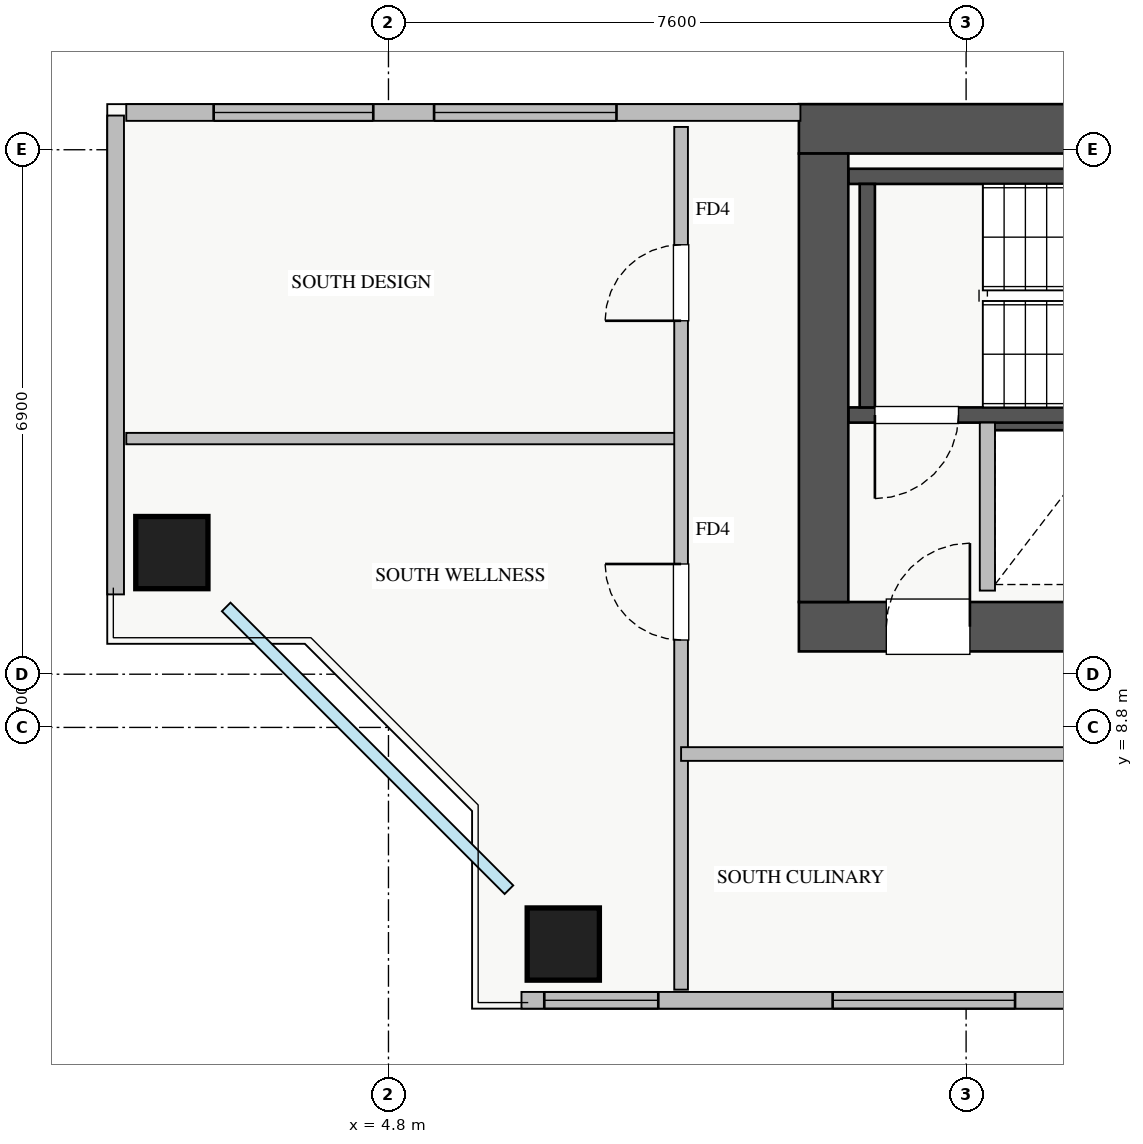
"""IFC4 building model, lengths in metres.
Left out: names, types, materials, properties, quantities, classifications, styles, units other than length and angle.
Written with IfcOpenShell. Run it as: python <this file> out.ifc"""

import sys

from ifc_helpers import new_model, si_unit, direction, frame, frame_2d, origin, origin_2d, place, context, subcontext, project, spatial, rectangle, extrude, source, transform, mapped, element, fill, save


model = new_model("IFC4")
c1 = context("Model", 3, precision=1e-05, world=origin(), true_north=direction((0.0, 1.0)))
c2 = subcontext(c1, "Body", "Model", "MODEL_VIEW")
j1 = project(units=[si_unit("LENGTHUNIT", "METRE"), si_unit("PLANEANGLEUNIT", "RADIAN")], contexts=[c1])
p1 = place(None, origin())
s1 = spatial("IfcSite", under=j1, at=p1, CompositionType="ELEMENT")
p2 = place(p1, origin())
s2 = spatial("IfcBuilding", under=s1, at=p2, CompositionType="ELEMENT")
p3 = place(p2, frame((0.0, 0.0, 169.75)))
s3 = spatial("IfcBuildingStorey", under=s2, at=p3, CompositionType="ELEMENT", Elevation=169.75)
p4 = place(p3, frame((12.68, 12.8, 0.0), z_axis=(0.0, 0.0, 1.0), x_axis=(1.0, 0.0, 0.0)))
e1 = element("IfcWall", 1, at=p4, inside=s3, PredefinedType="SHEAR", context=c2, shape_type="SweptSolid", body=[
    extrude(rectangle(XDim=1.94, YDim=0.18, at=frame_2d((0.97, 0.0))), origin(), (0.0, 0.0, 1.0), 3.0),
])
p5 = place(p3, frame((10.85, 12.91, 0.0), z_axis=(0.0, 0.0, 1.0), x_axis=(1.0, 0.0, 0.0)))
e2 = element("IfcWall", 2, at=p5, inside=s3, PredefinedType="SHEAR", context=c2, shape_type="SweptSolid", body=[
    extrude(rectangle(XDim=7.3, YDim=0.2, at=frame_2d((3.65, 0.0))), origin(), (0.0, 0.0, 1.0), 3.25),
])
p6 = place(p5, frame((0.35, 0.0, 0.0)))
e3 = element("IfcOpeningElement", 3, at=p6, cuts=e2, PredefinedType="OPENING", context=c2, shape_type="SweptSolid", body=[
    extrude(rectangle(XDim=1.1, YDim=2.05, at=frame_2d((0.55, 1.025))), frame((0.0, 0.11, 0.0), z_axis=(0.0, -1.0, 0.0), x_axis=(1.0, 0.0, 0.0)), (0.0, 0.0, 1.0), 0.22),
])
p7 = place(p3, frame((10.85, 16.05, 0.0), z_axis=(0.0, 0.0, 1.0), x_axis=(1.0, 0.0, 0.0)))
e4 = element("IfcWall", 4, at=p7, inside=s3, PredefinedType="SHEAR", context=c2, shape_type="SweptSolid", body=[
    extrude(rectangle(XDim=7.3, YDim=0.2, at=frame_2d((3.65, 0.0))), origin(), (0.0, 0.0, 1.0), 3.25),
])
p8 = place(p3, frame((11.1, 13.01, 0.0), z_axis=(0.0, 0.0, 1.0), x_axis=(0.0, 1.0, 0.0)))
e5 = element("IfcWall", 5, at=p8, inside=s3, PredefinedType="SHEAR", context=c2, shape_type="SweptSolid", body=[
    extrude(rectangle(XDim=2.94, YDim=0.2, at=frame_2d((1.47, 0.0))), origin(), (0.0, 0.0, 1.0), 3.25),
])
p9 = place(p3, frame((10.2, 10.125, 0.0), z_axis=(0.0, 0.0, 1.0), x_axis=(1.0, 0.0, 0.0)))
e6 = element("IfcWall", 6, at=p9, inside=s3, PredefinedType="SHEAR", context=c2, shape_type="SweptSolid", body=[
    extrude(rectangle(XDim=17.6, YDim=0.65, at=frame_2d((8.8, 0.0))), origin(), (0.0, 0.0, 1.0), 3.25),
])
p10 = place(p9, frame((1.15, 0.0, 0.0)))
e7 = element("IfcOpeningElement", 7, at=p10, cuts=e6, PredefinedType="OPENING", context=c2, shape_type="SweptSolid", body=[
    extrude(rectangle(XDim=1.1, YDim=2.05, at=frame_2d((0.55, 1.025))), frame((0.0, 0.335, 0.0), z_axis=(0.0, -1.0, 0.0), x_axis=(1.0, 0.0, 0.0)), (0.0, 0.0, 1.0), 0.67),
])
p11 = place(p9, frame((8.3, 0.0, 0.0)))
e8 = element("IfcOpeningElement", 8, at=p11, cuts=e6, PredefinedType="OPENING", context=c2, shape_type="SweptSolid", body=[
    extrude(rectangle(XDim=1.1, YDim=2.05, at=frame_2d((0.55, 1.025))), frame((0.0, 0.335, 0.0), z_axis=(0.0, -1.0, 0.0), x_axis=(1.0, 0.0, 0.0)), (0.0, 0.0, 1.0), 0.67),
])
p12 = place(p9, frame((4.9, 0.0, 0.0)))
e9 = element("IfcOpeningElement", 9, at=p12, cuts=e6, PredefinedType="OPENING", context=c2, shape_type="SweptSolid", body=[
    extrude(rectangle(XDim=1.1, YDim=2.05, at=frame_2d((0.55, 1.025))), frame((0.0, 0.335, 0.0), z_axis=(0.0, -1.0, 0.0), x_axis=(1.0, 0.0, 0.0)), (0.0, 0.0, 1.0), 0.67),
])
p13 = place(p9, frame((14.74, 0.0, 0.0)))
e10 = element("IfcOpeningElement", 10, at=p13, cuts=e6, PredefinedType="OPENING", context=c2, shape_type="SweptSolid", body=[
    extrude(rectangle(XDim=1.0, YDim=2.05, at=frame_2d((0.5, 1.025))), frame((0.0, 0.335, 0.0), z_axis=(0.0, -1.0, 0.0), x_axis=(1.0, 0.0, 0.0)), (0.0, 0.0, 1.0), 0.67),
])
p14 = place(p9, frame((10.64, 0.0, 0.0)))
e11 = element("IfcOpeningElement", 11, at=p14, cuts=e6, PredefinedType="OPENING", context=c2, shape_type="SweptSolid", body=[
    extrude(rectangle(XDim=1.0, YDim=2.05, at=frame_2d((0.5, 1.025))), frame((0.0, 0.335, 0.0), z_axis=(0.0, -1.0, 0.0), x_axis=(1.0, 0.0, 0.0)), (0.0, 0.0, 1.0), 0.67),
])
p15 = place(p9, frame((13.09, 0.0, 0.0)))
e12 = element("IfcOpeningElement", 12, at=p15, cuts=e6, PredefinedType="OPENING", context=c2, shape_type="SweptSolid", body=[
    extrude(rectangle(XDim=1.0, YDim=2.05, at=frame_2d((0.5, 1.025))), frame((0.0, 0.335, 0.0), z_axis=(0.0, -1.0, 0.0), x_axis=(1.0, 0.0, 0.0)), (0.0, 0.0, 1.0), 0.67),
])
p16 = place(p3, frame((10.2, 16.675, 0.0), z_axis=(0.0, 0.0, 1.0), x_axis=(1.0, 0.0, 0.0)))
e13 = element("IfcWall", 13, at=p16, inside=s3, PredefinedType="SHEAR", context=c2, shape_type="SweptSolid", body=[
    extrude(rectangle(XDim=17.6, YDim=0.65, at=frame_2d((8.8, 0.0))), origin(), (0.0, 0.0, 1.0), 3.25),
])
p17 = place(p3, frame((10.525, 10.45, 0.0), z_axis=(0.0, 0.0, 1.0), x_axis=(0.0, 1.0, 0.0)))
e14 = element("IfcWall", 14, at=p17, inside=s3, PredefinedType="SHEAR", context=c2, shape_type="SweptSolid", body=[
    extrude(rectangle(XDim=5.9, YDim=0.65, at=frame_2d((2.95, 0.0))), origin(), (0.0, 0.0, 1.0), 3.25),
])
m1 = source(origin(), c2, "Body", "SweptSolid", [
    extrude(rectangle(XDim=0.95, YDim=0.95, at=origin_2d()), origin(), (0.0, 0.0, 1.0), 3.25),
])
for number, where, z_axis, x_axis in (
    (15, (7.1, 5.95, 0.0), (0.0, 0.0, 1.0), (1.0, 0.0, 0.0)),
    (16, (1.95, 11.1, 0.0), (0.0, 0.0, 1.0), (1.0, 0.0, 0.0)),
):
    element("IfcColumn", number, at=place(p3, frame(where, z_axis=z_axis, x_axis=x_axis)), inside=s3, PredefinedType="COLUMN", context=c2, shape_type="MappedRepresentation", body=[
        mapped(m1, transform((0.0, 0.0, 0.0), x_axis=(1.0, 0.0, 0.0), y_axis=(0.0, 1.0, 0.0), z_axis=(0.0, 0.0, 1.0), scale=1.0)),
    ])
p18 = place(p3, frame((1.35, 16.89, 0.0), z_axis=(0.0, 0.0, 1.0), x_axis=(1.0, 0.0, 0.0)))
e17 = element("IfcWall", 17, at=p18, inside=s3, PredefinedType="STANDARD", context=c2, shape_type="SweptSolid", body=[
    extrude(rectangle(XDim=8.87, YDim=0.22, at=frame_2d((4.435, 0.0))), origin(), (0.0, 0.0, 1.0), 2.54),
])
p19 = place(p18, frame((1.15, 0.0, 0.9)))
e18 = element("IfcOpeningElement", 18, at=p19, cuts=e17, PredefinedType="OPENING", context=c2, shape_type="SweptSolid", body=[
    extrude(rectangle(XDim=2.1, YDim=1.46, at=frame_2d((1.05, 0.73))), frame((0.0, 0.12, 0.0), z_axis=(0.0, -1.0, 0.0), x_axis=(1.0, 0.0, 0.0)), (0.0, 0.0, 1.0), 0.24),
])
p20 = place(p18, frame((4.05, 0.0, 0.9)))
e19 = element("IfcOpeningElement", 19, at=p20, cuts=e17, PredefinedType="OPENING", context=c2, shape_type="SweptSolid", body=[
    extrude(rectangle(XDim=2.4, YDim=1.5, at=frame_2d((1.2, 0.75))), frame((0.0, 0.12, 0.0), z_axis=(0.0, -1.0, 0.0), x_axis=(1.0, 0.0, 0.0)), (0.0, 0.0, 1.0), 0.24),
])
p21 = place(p3, frame((1.21, 10.55, 0.0), z_axis=(0.0, 0.0, 1.0), x_axis=(0.0, 1.0, 0.0)))
e20 = element("IfcWall", 20, at=p21, inside=s3, PredefinedType="STANDARD", context=c2, shape_type="SweptSolid", body=[
    extrude(rectangle(XDim=6.3, YDim=0.22, at=frame_2d((3.15, 0.0))), origin(), (0.0, 0.0, 1.0), 2.54),
])
p22 = place(p3, frame((6.55, 5.21, 0.0), z_axis=(0.0, 0.0, 1.0), x_axis=(1.0, 0.0, 0.0)))
e21 = element("IfcWall", 21, at=p22, inside=s3, PredefinedType="STANDARD", context=c2, shape_type="SweptSolid", body=[
    extrude(rectangle(XDim=24.9, YDim=0.22, at=frame_2d((12.45, 0.0))), origin(), (0.0, 0.0, 1.0), 2.54),
])
p23 = place(p22, frame((0.3, 0.0, 0.9)))
e22 = element("IfcOpeningElement", 22, at=p23, cuts=e21, PredefinedType="OPENING", context=c2, shape_type="SweptSolid", body=[
    extrude(rectangle(XDim=1.5, YDim=1.5, at=frame_2d((0.75, 0.75))), frame((0.0, 0.12, 0.0), z_axis=(0.0, -1.0, 0.0), x_axis=(1.0, 0.0, 0.0)), (0.0, 0.0, 1.0), 0.24),
])
p24 = place(p22, frame((8.438, 0.0, 0.9)))
e23 = element("IfcOpeningElement", 23, at=p24, cuts=e21, PredefinedType="OPENING", context=c2, shape_type="SweptSolid", body=[
    extrude(rectangle(XDim=1.8, YDim=1.45, at=frame_2d((0.9, 0.725))), frame((0.0, 0.12, 0.0), z_axis=(0.0, -1.0, 0.0), x_axis=(1.0, 0.0, 0.0)), (0.0, 0.0, 1.0), 0.24),
])
p25 = place(p22, frame((14.813, 0.0, 0.9)))
e24 = element("IfcOpeningElement", 24, at=p25, cuts=e21, PredefinedType="OPENING", context=c2, shape_type="SweptSolid", body=[
    extrude(rectangle(XDim=1.5, YDim=1.45, at=frame_2d((0.75, 0.725))), frame((0.0, 0.12, 0.0), z_axis=(0.0, -1.0, 0.0), x_axis=(1.0, 0.0, 0.0)), (0.0, 0.0, 1.0), 0.24),
])
p26 = place(p22, frame((20.738, 0.0, 0.9)))
e25 = element("IfcOpeningElement", 25, at=p26, cuts=e21, PredefinedType="OPENING", context=c2, shape_type="SweptSolid", body=[
    extrude(rectangle(XDim=2.1, YDim=1.46, at=frame_2d((1.05, 0.73))), frame((0.0, 0.12, 0.0), z_axis=(0.0, -1.0, 0.0), x_axis=(1.0, 0.0, 0.0)), (0.0, 0.0, 1.0), 0.24),
])
p27 = place(p22, frame((4.094, 0.0, 0.9)))
e26 = element("IfcOpeningElement", 26, at=p27, cuts=e21, PredefinedType="OPENING", context=c2, shape_type="SweptSolid", body=[
    extrude(rectangle(XDim=2.4, YDim=1.5, at=frame_2d((1.2, 0.75))), frame((0.0, 0.12, 0.0), z_axis=(0.0, -1.0, 0.0), x_axis=(1.0, 0.0, 0.0)), (0.0, 0.0, 1.0), 0.24),
])
p28 = place(p3, frame((12.68, 10.6, 0.0), z_axis=(0.0, 0.0, 1.0), x_axis=(0.0, 1.0, 0.0)))
e27 = element("IfcWall", 27, at=p28, inside=s3, PredefinedType="PARTITIONING", context=c2, shape_type="SweptSolid", body=[
    extrude(rectangle(XDim=2.21, YDim=0.2, at=frame_2d((1.105, 0.0))), origin(), (0.0, 0.0, 1.0), 3.0),
])
p29 = place(p3, frame((1.35, 12.6, 0.0), z_axis=(0.0, 0.0, 1.0), x_axis=(1.0, 0.0, 0.0)))
e28 = element("IfcWall", 28, at=p29, inside=s3, PredefinedType="PARTITIONING", context=c2, shape_type="SweptSolid", body=[
    extrude(rectangle(XDim=7.3, YDim=0.15, at=frame_2d((3.65, 0.0))), origin(), (0.0, 0.0, 1.0), 3.0),
])
p30 = place(p3, frame((8.65, 5.35, 0.0), z_axis=(0.0, 0.0, 1.0), x_axis=(0.0, 1.0, 0.0)))
e29 = element("IfcWall", 29, at=p30, inside=s3, PredefinedType="PARTITIONING", context=c2, shape_type="SweptSolid", body=[
    extrude(rectangle(XDim=11.35, YDim=0.18, at=frame_2d((5.675, 0.0))), origin(), (0.0, 0.0, 1.0), 3.0),
])
p31 = place(p30, frame((4.6, 0.0, 0.0)))
e30 = element("IfcOpeningElement", 30, at=p31, cuts=e29, PredefinedType="OPENING", context=c2, shape_type="SweptSolid", body=[
    extrude(rectangle(XDim=1.0, YDim=2.05, at=frame_2d((0.5, 1.025))), frame((0.0, 0.1, 0.0), z_axis=(0.0, -1.0, 0.0), x_axis=(1.0, 0.0, 0.0)), (0.0, 0.0, 1.0), 0.2),
])
p32 = place(p30, frame((8.8, 0.0, 0.0)))
e31 = element("IfcOpeningElement", 31, at=p32, cuts=e29, PredefinedType="OPENING", context=c2, shape_type="SweptSolid", body=[
    extrude(rectangle(XDim=1.0, YDim=2.05, at=frame_2d((0.5, 1.025))), frame((0.0, 0.1, 0.0), z_axis=(0.0, -1.0, 0.0), x_axis=(1.0, 0.0, 0.0)), (0.0, 0.0, 1.0), 0.2),
])
p33 = place(p3, frame((8.65, 8.45, 0.0), z_axis=(0.0, 0.0, 1.0), x_axis=(1.0, 0.0, 0.0)))
e32 = element("IfcWall", 32, at=p33, inside=s3, PredefinedType="PARTITIONING", context=c2, shape_type="SweptSolid", body=[
    extrude(rectangle(XDim=23.8, YDim=0.18, at=frame_2d((11.9, 0.0))), origin(), (0.0, 0.0, 1.0), 3.0),
])
p34 = place(p33, frame((5.425, 0.0, 0.0)))
e33 = element("IfcOpeningElement", 33, at=p34, cuts=e32, PredefinedType="OPENING", context=c2, shape_type="SweptSolid", body=[
    extrude(rectangle(XDim=1.0, YDim=2.05, at=frame_2d((0.5, 1.025))), frame((0.0, 0.1, 0.0), z_axis=(0.0, -1.0, 0.0), x_axis=(1.0, 0.0, 0.0)), (0.0, 0.0, 1.0), 0.2),
])
p35 = place(p33, frame((17.325, 0.0, 0.0)))
e34 = element("IfcOpeningElement", 34, at=p35, cuts=e32, PredefinedType="OPENING", context=c2, shape_type="SweptSolid", body=[
    extrude(rectangle(XDim=1.0, YDim=2.05, at=frame_2d((0.5, 1.025))), frame((0.0, 0.1, 0.0), z_axis=(0.0, -1.0, 0.0), x_axis=(1.0, 0.0, 0.0)), (0.0, 0.0, 1.0), 0.2),
])
m2 = source(origin(), c2, "Body", "SweptSolid", [
    extrude(rectangle(XDim=2.1, YDim=1.46, at=frame_2d((1.05, 0.73))), frame((0.0, 0.03, 0.0), z_axis=(0.0, -1.0, 0.0), x_axis=(1.0, 0.0, 0.0)), (0.0, 0.0, 1.0), 0.06),
])
p36 = place(p19, origin())
e35 = element("IfcWindow", 35, at=p36, inside=s3, PartitioningType="TRIPLE_PANEL_VERTICAL", PredefinedType="WINDOW", context=c2, shape_type="MappedRepresentation", body=[
    mapped(m2, transform((0.0, 0.0, 0.0), x_axis=(1.0, 0.0, 0.0), y_axis=(0.0, 1.0, 0.0), z_axis=(0.0, 0.0, 1.0), scale=1.0)),
])
fill(e18, e35)
m3 = source(origin(), c2, "Body", "SweptSolid", [
    extrude(rectangle(XDim=2.4, YDim=1.5, at=frame_2d((1.2, 0.75))), frame((0.0, 0.03, 0.0), z_axis=(0.0, -1.0, 0.0), x_axis=(1.0, 0.0, 0.0)), (0.0, 0.0, 1.0), 0.06),
])
p37 = place(p20, origin())
e36 = element("IfcWindow", 36, at=p37, inside=s3, PartitioningType="TRIPLE_PANEL_VERTICAL", PredefinedType="WINDOW", context=c2, shape_type="MappedRepresentation", body=[
    mapped(m3, transform((0.0, 0.0, 0.0), x_axis=(1.0, 0.0, 0.0), y_axis=(0.0, 1.0, 0.0), z_axis=(0.0, 0.0, 1.0), scale=1.0)),
])
fill(e19, e36)
m4 = source(origin(), c2, "Body", "SweptSolid", [
    extrude(rectangle(XDim=1.5, YDim=1.5, at=frame_2d((0.75, 0.75))), frame((0.0, 0.03, 0.0), z_axis=(0.0, -1.0, 0.0), x_axis=(1.0, 0.0, 0.0)), (0.0, 0.0, 1.0), 0.06),
])
p38 = place(p23, origin())
e37 = element("IfcWindow", 37, at=p38, inside=s3, PartitioningType="TRIPLE_PANEL_VERTICAL", PredefinedType="WINDOW", context=c2, shape_type="MappedRepresentation", body=[
    mapped(m4, transform((0.0, 0.0, 0.0), x_axis=(1.0, 0.0, 0.0), y_axis=(0.0, 1.0, 0.0), z_axis=(0.0, 0.0, 1.0), scale=1.0)),
])
fill(e22, e37)
m5 = source(origin(), c2, "Body", "SweptSolid", [
    extrude(rectangle(XDim=1.1, YDim=2.05, at=frame_2d((0.55, 1.025))), frame((0.0, 0.025, 0.0), z_axis=(0.0, -1.0, 0.0), x_axis=(1.0, 0.0, 0.0)), (0.0, 0.0, 1.0), 0.05),
])
p39 = place(p10, origin())
e38 = element("IfcDoor", 38, at=p39, inside=s3, OperationType="SINGLE_SWING_RIGHT", PredefinedType="DOOR", context=c2, shape_type="MappedRepresentation", body=[
    mapped(m5, transform((0.0, 0.0, 0.0), x_axis=(1.0, 0.0, 0.0), y_axis=(0.0, 1.0, 0.0), z_axis=(0.0, 0.0, 1.0), scale=1.0)),
])
fill(e7, e38)
p40 = place(p6, frame((1.1, 0.0, 0.0), z_axis=(0.0, 0.0, 1.0), x_axis=(-1.0, 0.0, 0.0)))
e39 = element("IfcDoor", 39, at=p40, inside=s3, OperationType="SINGLE_SWING_LEFT", PredefinedType="DOOR", context=c2, shape_type="MappedRepresentation", body=[
    mapped(m5, transform((0.0, 0.0, 0.0), x_axis=(1.0, 0.0, 0.0), y_axis=(0.0, 1.0, 0.0), z_axis=(0.0, 0.0, 1.0), scale=1.0)),
])
fill(e3, e39)
m6 = source(origin(), c2, "Body", "SweptSolid", [
    extrude(rectangle(XDim=1.0, YDim=2.05, at=frame_2d((0.5, 1.025))), frame((0.0, 0.025, 0.0), z_axis=(0.0, -1.0, 0.0), x_axis=(1.0, 0.0, 0.0)), (0.0, 0.0, 1.0), 0.05),
])
p41 = place(p31, origin())
e40 = element("IfcDoor", 40, at=p41, inside=s3, OperationType="SINGLE_SWING_RIGHT", PredefinedType="DOOR", context=c2, shape_type="MappedRepresentation", body=[
    mapped(m6, transform((0.0, 0.0, 0.0), x_axis=(1.0, 0.0, 0.0), y_axis=(0.0, 1.0, 0.0), z_axis=(0.0, 0.0, 1.0), scale=1.0)),
])
fill(e30, e40)
p42 = place(p32, origin())
e41 = element("IfcDoor", 41, at=p42, inside=s3, OperationType="SINGLE_SWING_LEFT", PredefinedType="DOOR", context=c2, shape_type="MappedRepresentation", body=[
    mapped(m6, transform((0.0, 0.0, 0.0), x_axis=(1.0, 0.0, 0.0), y_axis=(0.0, 1.0, 0.0), z_axis=(0.0, 0.0, 1.0), scale=1.0)),
])
fill(e31, e41)
p43 = place(p27, origin())
e42 = element("IfcWindow", 42, at=p43, inside=s3, PartitioningType="TRIPLE_PANEL_VERTICAL", PredefinedType="WINDOW", context=c2, shape_type="MappedRepresentation", body=[
    mapped(m3, transform((0.0, 0.0, 0.0), x_axis=(1.0, 0.0, 0.0), y_axis=(0.0, 1.0, 0.0), z_axis=(0.0, 0.0, 1.0), scale=1.0)),
])
fill(e26, e42)
save(model, sys.argv[1])
